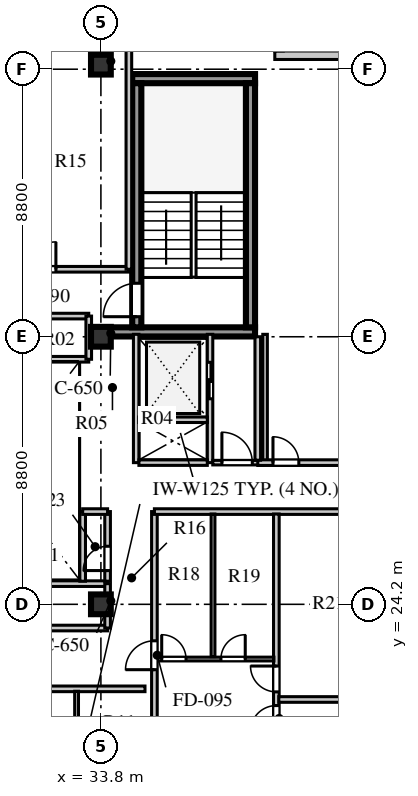
"""IFC4 building model, lengths in metres.
Left out: names, types, materials, properties, quantities, classifications, styles, units other than length and angle.
Written with IfcOpenShell. Run it as: python <this file> out.ifc"""

import sys

from ifc_helpers import new_model, si_unit, direction, frame, frame_2d, origin, origin_2d, place, context, subcontext, project, spatial, rectangle, extrude, element, fill, save


model = new_model("IFC4")
c1 = context("Model", 3, precision=1e-05, world=origin(), true_north=direction((0.0, 1.0)))
c2 = subcontext(c1, "Body", "Model", "MODEL_VIEW")
j1 = project(units=[si_unit("LENGTHUNIT", "METRE"), si_unit("PLANEANGLEUNIT", "RADIAN")], contexts=[c1])
p1 = place(None, origin())
s1 = spatial("IfcSite", under=j1, at=p1, CompositionType="ELEMENT")
p2 = place(p1, origin())
s2 = spatial("IfcBuilding", under=s1, at=p2, CompositionType="ELEMENT")
p3 = place(p2, frame((0.0, 0.0, 335.3)))
s3 = spatial("IfcBuildingStorey", under=s2, at=p3, CompositionType="ELEMENT", Elevation=335.3)
p4 = place(p3, frame((34.125, 33.16, 0.0), z_axis=(0.0, 0.0, 1.0), x_axis=(1.0, 0.0, 0.0)))
e1 = element("IfcWall", 1, at=p4, inside=s3, PredefinedType="SHEAR", context=c2, shape_type="SweptSolid", body=[
    extrude(rectangle(XDim=4.745, YDim=0.3, at=frame_2d((2.373, 0.0))), origin(), (0.0, 0.0, 1.0), 3.56),
])
p5 = place(p3, frame((34.83, 41.49, 0.0), z_axis=(0.0, 0.0, 1.0), x_axis=(1.0, 0.0, 0.0)))
e2 = element("IfcWall", 2, at=p5, inside=s3, PredefinedType="SHEAR", context=c2, shape_type="SweptSolid", body=[
    extrude(rectangle(XDim=4.04, YDim=0.3, at=frame_2d((2.02, 0.0))), origin(), (0.0, 0.0, 1.0), 3.56),
])
p6 = place(p3, frame((34.98, 33.31, 0.0), z_axis=(0.0, 0.0, 1.0), x_axis=(0.0, 1.0, 0.0)))
e3 = element("IfcWall", 3, at=p6, inside=s3, PredefinedType="SHEAR", context=c2, shape_type="SweptSolid", body=[
    extrude(rectangle(XDim=8.03, YDim=0.3, at=frame_2d((4.015, 0.0))), origin(), (0.0, 0.0, 1.0), 3.56),
])
p7 = place(p6, frame((0.35, 0.0, 0.0)))
e4 = element("IfcOpeningElement", 4, at=p7, cuts=e3, PredefinedType="OPENING", context=c2, shape_type="SweptSolid", body=[
    extrude(rectangle(XDim=1.1, YDim=2.1, at=frame_2d((0.55, 1.05))), frame((0.0, 0.16, 0.0), z_axis=(0.0, -1.0, 0.0), x_axis=(1.0, 0.0, 0.0)), (0.0, 0.0, 1.0), 0.32),
])
p8 = place(p3, frame((38.72, 33.31, 0.0), z_axis=(0.0, 0.0, 1.0), x_axis=(0.0, 1.0, 0.0)))
e5 = element("IfcWall", 5, at=p8, inside=s3, PredefinedType="SHEAR", context=c2, shape_type="SweptSolid", body=[
    extrude(rectangle(XDim=8.03, YDim=0.3, at=frame_2d((4.015, 0.0))), origin(), (0.0, 0.0, 1.0), 3.56),
])
for number, where, z_axis, x_axis in (
    (6, (33.8, 24.2, 0.0), (0.0, 0.0, 1.0), (1.0, 0.0, 0.0)),
    (7, (33.8, 33.0, 0.0), (0.0, 0.0, 1.0), (1.0, 0.0, 0.0)),
    (8, (33.8, 41.95, 0.0), (0.0, 0.0, 1.0), (1.0, 0.0, 0.0)),
):
    element("IfcColumn", number, at=place(p3, frame(where, z_axis=z_axis, x_axis=x_axis)), inside=s3, PredefinedType="COLUMN", context=c2, shape_type="SweptSolid", body=[
        extrude(rectangle(XDim=0.65, YDim=0.65, at=origin_2d()), origin(), (0.0, 0.0, 1.0), 3.56),
    ])
p9 = place(p3, frame((43.2, 42.26, 0.0), z_axis=(0.0, 0.0, 1.0), x_axis=(-1.0, 0.0, 0.0)))
e9 = element("IfcWall", 9, at=p9, inside=s3, PredefinedType="STANDARD", context=c2, shape_type="SweptSolid", body=[
    extrude(rectangle(XDim=3.68, YDim=0.28, at=frame_2d((1.84, 0.0))), origin(), (0.0, 0.0, 1.0), 2.92),
])
p10 = place(p3, frame((34.96, 28.86, 0.0), z_axis=(0.0, 0.0, 1.0), x_axis=(0.0, 1.0, 0.0)))
e10 = element("IfcWall", 10, at=p10, inside=s3, PredefinedType="SOLIDWALL", context=c2, shape_type="SweptSolid", body=[
    extrude(rectangle(XDim=4.22, YDim=0.18, at=frame_2d((2.11, 0.0))), origin(), (0.0, 0.0, 1.0), 3.56),
])
p11 = place(p3, frame((37.39, 28.86, 0.0), z_axis=(0.0, 0.0, 1.0), x_axis=(0.0, 1.0, 0.0)))
e11 = element("IfcWall", 11, at=p11, inside=s3, PredefinedType="SOLIDWALL", context=c2, shape_type="SweptSolid", body=[
    extrude(rectangle(XDim=4.22, YDim=0.18, at=frame_2d((2.11, 0.0))), origin(), (0.0, 0.0, 1.0), 3.56),
])
p12 = place(p11, frame((2.1, 0.0, 0.0)))
e12 = element("IfcOpeningElement", 12, at=p12, cuts=e11, PredefinedType="OPENING", context=c2, shape_type="SweptSolid", body=[
    extrude(rectangle(XDim=1.2, YDim=2.12, at=frame_2d((0.6, 1.06))), frame((0.0, 0.1, 0.0), z_axis=(0.0, -1.0, 0.0), x_axis=(1.0, 0.0, 0.0)), (0.0, 0.0, 1.0), 0.2),
])
for number, where, z_axis, x_axis in (
    (13, (35.05, 28.86, 0.0), (0.0, 0.0, 1.0), (1.0, 0.0, 0.0)),
    (14, (35.05, 30.27, 0.0), (0.0, 0.0, 1.0), (1.0, 0.0, 0.0)),
):
    element("IfcWall", number, at=place(p3, frame(where, z_axis=z_axis, x_axis=x_axis)), inside=s3, PredefinedType="SOLIDWALL", context=c2, shape_type="SweptSolid", body=[
        extrude(rectangle(XDim=2.25, YDim=0.18, at=frame_2d((1.125, 0.0))), origin(), (0.0, 0.0, 1.0), 3.56),
    ])
p13 = place(p3, frame((39.2, 28.86, 0.0), z_axis=(0.0, 0.0, 1.0), x_axis=(0.0, 1.0, 0.0)))
e15 = element("IfcWall", 15, at=p13, inside=s3, PredefinedType="PARTITIONING", context=c2, shape_type="SweptSolid", body=[
    extrude(rectangle(XDim=4.22, YDim=0.15, at=frame_2d((2.11, 0.0))), origin(), (0.0, 0.0, 1.0), 3.56),
])
p14 = place(p3, frame((37.48, 28.86, 0.0), z_axis=(0.0, 0.0, 1.0), x_axis=(1.0, 0.0, 0.0)))
e16 = element("IfcWall", 16, at=p14, inside=s3, PredefinedType="PARTITIONING", context=c2, shape_type="SweptSolid", body=[
    extrude(rectangle(XDim=1.64, YDim=0.15, at=frame_2d((0.82, 0.0))), origin(), (0.0, 0.0, 1.0), 3.56),
])
p15 = place(p14, frame((0.3, 0.0, 0.0)))
e17 = element("IfcOpeningElement", 17, at=p15, cuts=e16, PredefinedType="OPENING", context=c2, shape_type="SweptSolid", body=[
    extrude(rectangle(XDim=1.0, YDim=2.1, at=frame_2d((0.5, 1.05))), frame((0.0, 0.085, 0.0), z_axis=(0.0, -1.0, 0.0), x_axis=(1.0, 0.0, 0.0)), (0.0, 0.0, 1.0), 0.17),
])
p16 = place(p3, frame((27.08, 21.42, 0.0), z_axis=(0.0, 0.0, 1.0), x_axis=(1.0, 0.0, 0.0)))
e18 = element("IfcWall", 18, at=p16, inside=s3, PredefinedType="SOLIDWALL", context=c2, shape_type="SweptSolid", body=[
    extrude(rectangle(XDim=8.17, YDim=0.185, at=frame_2d((4.085, 0.0))), origin(), (0.0, 0.0, 1.0), 3.26),
])
p17 = place(p16, frame((0.63, 0.0, 0.0)))
e19 = element("IfcOpeningElement", 19, at=p17, cuts=e18, PredefinedType="OPENING", context=c2, shape_type="SweptSolid", body=[
    extrude(rectangle(XDim=0.95, YDim=2.1, at=frame_2d((0.475, 1.05))), frame((0.0, 0.103, 0.0), z_axis=(0.0, -1.0, 0.0), x_axis=(1.0, 0.0, 0.0)), (0.0, 0.0, 1.0), 0.205),
])
p18 = place(p3, frame((25.22, 35.22, 0.0), z_axis=(0.0, 0.0, 1.0), x_axis=(1.0, 0.0, 0.0)))
e20 = element("IfcWall", 20, at=p18, inside=s3, PredefinedType="SOLIDWALL", context=c2, shape_type="SweptSolid", body=[
    extrude(rectangle(XDim=9.5, YDim=0.185, at=frame_2d((4.75, 0.0))), origin(), (0.0, 0.0, 1.0), 3.56),
])
p19 = place(p18, frame((3.2, 0.0, 0.0)))
e21 = element("IfcOpeningElement", 21, at=p19, cuts=e20, PredefinedType="OPENING", context=c2, shape_type="SweptSolid", body=[
    extrude(rectangle(XDim=1.0, YDim=2.08, at=frame_2d((0.5, 1.04))), frame((0.0, 0.103, 0.0), z_axis=(0.0, -1.0, 0.0), x_axis=(1.0, 0.0, 0.0)), (0.0, 0.0, 1.0), 0.205),
])
p20 = place(p18, frame((6.2, 0.0, 0.0)))
e22 = element("IfcOpeningElement", 22, at=p20, cuts=e20, PredefinedType="OPENING", context=c2, shape_type="SweptSolid", body=[
    extrude(rectangle(XDim=0.9, YDim=2.08, at=frame_2d((0.45, 1.04))), frame((0.0, 0.103, 0.0), z_axis=(0.0, -1.0, 0.0), x_axis=(1.0, 0.0, 0.0)), (0.0, 0.0, 1.0), 0.205),
])
p21 = place(p3, frame((33.0, 16.397, 0.0), z_axis=(0.0, 0.0, 1.0), x_axis=(0.0, 1.0, 0.0)))
e23 = element("IfcWall", 23, at=p21, inside=s3, PredefinedType="PLUMBINGWALL", context=c2, shape_type="SweptSolid", body=[
    extrude(rectangle(XDim=4.943, YDim=0.125, at=frame_2d((2.472, 0.0))), origin(), (0.0, 0.0, 1.0), 3.56),
])
p22 = place(p21, frame((0.16, 0.0, 0.0)))
e24 = element("IfcOpeningElement", 24, at=p22, cuts=e23, PredefinedType="OPENING", context=c2, shape_type="SweptSolid", body=[
    extrude(rectangle(XDim=0.8, YDim=2.05, at=frame_2d((0.4, 1.025))), frame((0.0, 0.073, 0.0), z_axis=(0.0, -1.0, 0.0), x_axis=(1.0, 0.0, 0.0)), (0.0, 0.0, 1.0), 0.145),
])
p23 = place(p21, frame((2.653, 0.0, 0.0)))
e25 = element("IfcOpeningElement", 25, at=p23, cuts=e23, PredefinedType="OPENING", context=c2, shape_type="SweptSolid", body=[
    extrude(rectangle(XDim=0.85, YDim=2.08, at=frame_2d((0.425, 1.04))), frame((0.0, 0.073, 0.0), z_axis=(0.0, -1.0, 0.0), x_axis=(1.0, 0.0, 0.0)), (0.0, 0.0, 1.0), 0.145),
])
p24 = place(p3, frame((34.72, 35.22, 0.0), z_axis=(0.0, 0.0, 1.0), x_axis=(0.0, 1.0, 0.0)))
e26 = element("IfcWall", 26, at=p24, inside=s3, PredefinedType="SOLIDWALL", context=c2, shape_type="SweptSolid", body=[
    extrude(rectangle(XDim=10.3, YDim=0.185, at=frame_2d((5.15, 0.0))), origin(), (0.0, 0.0, 1.0), 3.56),
])
p25 = place(p3, frame((35.56, 15.08, 0.0), z_axis=(0.0, 0.0, 1.0), x_axis=(0.0, 1.0, 0.0)))
e27 = element("IfcWall", 27, at=p25, inside=s3, PredefinedType="SOLIDWALL", context=c2, shape_type="SweptSolid", body=[
    extrude(rectangle(XDim=12.17, YDim=0.185, at=frame_2d((6.085, 0.0))), origin(), (0.0, 0.0, 1.0), 3.56),
])
p26 = place(p25, frame((6.97, 0.0, 0.0)))
e28 = element("IfcOpeningElement", 28, at=p26, cuts=e27, PredefinedType="OPENING", context=c2, shape_type="SweptSolid", body=[
    extrude(rectangle(XDim=0.95, YDim=2.1, at=frame_2d((0.475, 1.05))), frame((0.0, 0.103, 0.0), z_axis=(0.0, -1.0, 0.0), x_axis=(1.0, 0.0, 0.0)), (0.0, 0.0, 1.0), 0.205),
])
p27 = place(p3, frame((35.56, 27.25, 0.0), z_axis=(0.0, 0.0, 1.0), x_axis=(1.0, 0.0, 0.0)))
e29 = element("IfcWall", 29, at=p27, inside=s3, PredefinedType="SOLIDWALL", context=c2, shape_type="SweptSolid", body=[
    extrude(rectangle(XDim=7.36, YDim=0.185, at=frame_2d((3.68, 0.0))), origin(), (0.0, 0.0, 1.0), 3.56),
])
p28 = place(p3, frame((39.571, 15.16, 0.0), z_axis=(0.0, 0.0, 1.0), x_axis=(0.0, 1.0, 0.0)))
e30 = element("IfcWall", 30, at=p28, inside=s3, PredefinedType="SOLIDWALL", context=c2, shape_type="SweptSolid", body=[
    extrude(rectangle(XDim=12.01, YDim=0.185, at=frame_2d((6.005, 0.0))), origin(), (0.0, 0.0, 1.0), 3.56),
])
p29 = place(p28, frame((4.86, 0.0, 0.0)))
e31 = element("IfcOpeningElement", 31, at=p29, cuts=e30, PredefinedType="OPENING", context=c2, shape_type="SweptSolid", body=[
    extrude(rectangle(XDim=0.85, YDim=2.08, at=frame_2d((0.425, 1.04))), frame((0.0, 0.103, 0.0), z_axis=(0.0, -1.0, 0.0), x_axis=(1.0, 0.0, 0.0)), (0.0, 0.0, 1.0), 0.205),
])
p30 = place(p28, frame((6.16, 0.0, 0.0)))
e32 = element("IfcOpeningElement", 32, at=p30, cuts=e30, PredefinedType="OPENING", context=c2, shape_type="SweptSolid", body=[
    extrude(rectangle(XDim=0.85, YDim=2.08, at=frame_2d((0.425, 1.04))), frame((0.0, 0.103, 0.0), z_axis=(0.0, -1.0, 0.0), x_axis=(1.0, 0.0, 0.0)), (0.0, 0.0, 1.0), 0.205),
])
p31 = place(p3, frame((35.64, 22.4, 0.0), z_axis=(0.0, 0.0, 1.0), x_axis=(1.0, 0.0, 0.0)))
e33 = element("IfcWall", 33, at=p31, inside=s3, PredefinedType="PLUMBINGWALL", context=c2, shape_type="SweptSolid", body=[
    extrude(rectangle(XDim=3.851, YDim=0.125, at=frame_2d((1.926, 0.0))), origin(), (0.0, 0.0, 1.0), 3.56),
])
p32 = place(p31, frame((0.16, 0.0, 0.0)))
e34 = element("IfcOpeningElement", 34, at=p32, cuts=e33, PredefinedType="OPENING", context=c2, shape_type="SweptSolid", body=[
    extrude(rectangle(XDim=0.8, YDim=2.05, at=frame_2d((0.4, 1.025))), frame((0.0, 0.073, 0.0), z_axis=(0.0, -1.0, 0.0), x_axis=(1.0, 0.0, 0.0)), (0.0, 0.0, 1.0), 0.145),
])
p33 = place(p31, frame((2.108, 0.0, 0.0)))
e35 = element("IfcOpeningElement", 35, at=p33, cuts=e33, PredefinedType="OPENING", context=c2, shape_type="SweptSolid", body=[
    extrude(rectangle(XDim=0.8, YDim=2.05, at=frame_2d((0.4, 1.025))), frame((0.0, 0.073, 0.0), z_axis=(0.0, -1.0, 0.0), x_axis=(1.0, 0.0, 0.0)), (0.0, 0.0, 1.0), 0.145),
])
p34 = place(p3, frame((37.488, 22.48, 0.0), z_axis=(0.0, 0.0, 1.0), x_axis=(0.0, 1.0, 0.0)))
e36 = element("IfcWall", 36, at=p34, inside=s3, PredefinedType="PLUMBINGWALL", context=c2, shape_type="SweptSolid", body=[
    extrude(rectangle(XDim=4.69, YDim=0.125, at=frame_2d((2.345, 0.0))), origin(), (0.0, 0.0, 1.0), 3.56),
])
p35 = place(p3, frame((39.651, 21.07, 0.0), z_axis=(0.0, 0.0, 1.0), x_axis=(1.0, 0.0, 0.0)))
e37 = element("IfcWall", 37, at=p35, inside=s3, PredefinedType="SOLIDWALL", context=c2, shape_type="SweptSolid", body=[
    extrude(rectangle(XDim=3.269, YDim=0.185, at=frame_2d((1.635, 0.0))), origin(), (0.0, 0.0, 1.0), 3.56),
])
p36 = place(p3, frame((38.96, 28.86, 0.0), z_axis=(0.0, 0.0, 1.0), x_axis=(1.0, 0.0, 0.0)))
e38 = element("IfcWall", 38, at=p36, inside=s3, PredefinedType="SOLIDWALL", context=c2, shape_type="SweptSolid", body=[
    extrude(rectangle(XDim=3.96, YDim=0.185, at=frame_2d((1.98, 0.0))), origin(), (0.0, 0.0, 1.0), 3.56),
])
p37 = place(p36, frame((0.5, 0.0, 0.0)))
e39 = element("IfcOpeningElement", 39, at=p37, cuts=e38, PredefinedType="OPENING", context=c2, shape_type="SweptSolid", body=[
    extrude(rectangle(XDim=0.85, YDim=2.05, at=frame_2d((0.425, 1.025))), frame((0.0, 0.103, 0.0), z_axis=(0.0, -1.0, 0.0), x_axis=(1.0, 0.0, 0.0)), (0.0, 0.0, 1.0), 0.205),
])
p38 = place(p3, frame((38.96, 28.94, 0.0), z_axis=(0.0, 0.0, 1.0), x_axis=(0.0, 1.0, 0.0)))
e40 = element("IfcWall", 40, at=p38, inside=s3, PredefinedType="SOLIDWALL", context=c2, shape_type="SweptSolid", body=[
    extrude(rectangle(XDim=4.06, YDim=0.185, at=frame_2d((2.03, 0.0))), origin(), (0.0, 0.0, 1.0), 3.56),
])
p39 = place(p3, frame((27.2, 23.42, 0.0), z_axis=(0.0, 0.0, 1.0), x_axis=(1.0, 0.0, 0.0)))
e41 = element("IfcWall", 41, at=p39, inside=s3, PredefinedType="SOLIDWALL", context=c2, shape_type="SweptSolid", body=[
    extrude(rectangle(XDim=6.82, YDim=0.185, at=frame_2d((3.41, 0.0))), origin(), (0.0, 0.0, 1.0), 3.56),
])
p40 = place(p39, frame((0.43, 0.0, 0.0)))
e42 = element("IfcOpeningElement", 42, at=p40, cuts=e41, PredefinedType="OPENING", context=c2, shape_type="SweptSolid", body=[
    extrude(rectangle(XDim=0.8, YDim=2.05, at=frame_2d((0.4, 1.025))), frame((0.0, 0.103, 0.0), z_axis=(0.0, -1.0, 0.0), x_axis=(1.0, 0.0, 0.0)), (0.0, 0.0, 1.0), 0.205),
])
p41 = place(p3, frame((27.2, 24.88, 0.0), z_axis=(0.0, 0.0, 1.0), x_axis=(1.0, 0.0, 0.0)))
e43 = element("IfcWall", 43, at=p41, inside=s3, PredefinedType="SOLIDWALL", context=c2, shape_type="SweptSolid", body=[
    extrude(rectangle(XDim=6.82, YDim=0.185, at=frame_2d((3.41, 0.0))), origin(), (0.0, 0.0, 1.0), 3.01),
])
p42 = place(p3, frame((34.02, 23.42, 0.0), z_axis=(0.0, 0.0, 1.0), x_axis=(0.0, 1.0, 0.0)))
e44 = element("IfcWall", 44, at=p42, inside=s3, PredefinedType="SOLIDWALL", context=c2, shape_type="SweptSolid", body=[
    extrude(rectangle(XDim=1.46, YDim=0.185, at=frame_2d((0.73, 0.0))), origin(), (0.0, 0.0, 1.0), 2.96),
])
p43 = place(p3, frame((33.2, 24.96, 0.0), z_axis=(0.0, 0.0, 1.0), x_axis=(0.0, 1.0, 0.0)))
e45 = element("IfcWall", 45, at=p43, inside=s3, PredefinedType="SOLIDWALL", context=c2, shape_type="SweptSolid", body=[
    extrude(rectangle(XDim=2.29, YDim=0.185, at=frame_2d((1.145, 0.0))), origin(), (0.0, 0.0, 1.0), 3.01),
])
p44 = place(p3, frame((34.02, 24.96, 0.0), z_axis=(0.0, 0.0, 1.0), x_axis=(0.0, 1.0, 0.0)))
e46 = element("IfcWall", 46, at=p44, inside=s3, PredefinedType="SOLIDWALL", context=c2, shape_type="SweptSolid", body=[
    extrude(rectangle(XDim=2.29, YDim=0.185, at=frame_2d((1.145, 0.0))), origin(), (0.0, 0.0, 1.0), 2.96),
])
p45 = place(p44, frame((0.35, 0.0, 0.0)))
e47 = element("IfcOpeningElement", 47, at=p45, cuts=e46, PredefinedType="OPENING", context=c2, shape_type="SweptSolid", body=[
    extrude(rectangle(XDim=0.8, YDim=2.05, at=frame_2d((0.4, 1.025))), frame((0.0, 0.103, 0.0), z_axis=(0.0, -1.0, 0.0), x_axis=(1.0, 0.0, 0.0)), (0.0, 0.0, 1.0), 0.205),
])
p46 = place(p3, frame((33.2, 27.25, 0.0), z_axis=(0.0, 0.0, 1.0), x_axis=(1.0, 0.0, 0.0)))
e48 = element("IfcWall", 48, at=p46, inside=s3, PredefinedType="SOLIDWALL", context=c2, shape_type="SweptSolid", body=[
    extrude(rectangle(XDim=0.82, YDim=0.185, at=frame_2d((0.41, 0.0))), origin(), (0.0, 0.0, 1.0), 3.56),
])
p47 = place(p3, frame((27.2, 33.68, 0.0), z_axis=(0.0, 0.0, 1.0), x_axis=(1.0, 0.0, 0.0)))
e49 = element("IfcWall", 49, at=p47, inside=s3, PredefinedType="SOLIDWALL", context=c2, shape_type="SweptSolid", body=[
    extrude(rectangle(XDim=6.2, YDim=0.185, at=frame_2d((3.1, 0.0))), origin(), (0.0, 0.0, 1.0), 3.56),
])
p48 = place(p47, frame((1.2, 0.0, 0.0)))
e50 = element("IfcOpeningElement", 50, at=p48, cuts=e49, PredefinedType="OPENING", context=c2, shape_type="SweptSolid", body=[
    extrude(rectangle(XDim=0.8, YDim=2.05, at=frame_2d((0.4, 1.025))), frame((0.0, 0.103, 0.0), z_axis=(0.0, -1.0, 0.0), x_axis=(1.0, 0.0, 0.0)), (0.0, 0.0, 1.0), 0.205),
])
p49 = place(p3, frame((27.2, 32.26, 0.0), z_axis=(0.0, 0.0, 1.0), x_axis=(1.0, 0.0, 0.0)))
e51 = element("IfcWall", 51, at=p49, inside=s3, PredefinedType="SOLIDWALL", context=c2, shape_type="SweptSolid", body=[
    extrude(rectangle(XDim=6.2, YDim=0.185, at=frame_2d((3.1, 0.0))), origin(), (0.0, 0.0, 1.0), 3.01),
])
p50 = place(p3, frame((33.4, 32.26, 0.0), z_axis=(0.0, 0.0, 1.0), x_axis=(0.0, 1.0, 0.0)))
e52 = element("IfcWall", 52, at=p50, inside=s3, PredefinedType="SOLIDWALL", context=c2, shape_type="SweptSolid", body=[
    extrude(rectangle(XDim=1.42, YDim=0.185, at=frame_2d((0.71, 0.0))), origin(), (0.0, 0.0, 1.0), 3.01),
])
p51 = place(p7, origin())
e53 = element("IfcDoor", 53, at=p51, inside=s3, OperationType="SINGLE_SWING_LEFT", PredefinedType="DOOR", context=c2, shape_type="SweptSolid", body=[
    extrude(rectangle(XDim=1.1, YDim=2.1, at=frame_2d((0.55, 1.05))), frame((0.0, 0.025, 0.0), z_axis=(0.0, -1.0, 0.0), x_axis=(1.0, 0.0, 0.0)), (0.0, 0.0, 1.0), 0.05),
])
fill(e4, e53)
p52 = place(p12, frame((1.2, 0.0, 0.0), z_axis=(0.0, 0.0, 1.0), x_axis=(-1.0, 0.0, 0.0)))
e54 = element("IfcDoor", 54, at=p52, inside=s3, OperationType="DOUBLE_DOOR_SLIDING", PredefinedType="DOOR", context=c2, shape_type="SweptSolid", body=[
    extrude(rectangle(XDim=1.2, YDim=2.12, at=frame_2d((0.6, 1.06))), frame((0.0, 0.025, 0.0), z_axis=(0.0, -1.0, 0.0), x_axis=(1.0, 0.0, 0.0)), (0.0, 0.0, 1.0), 0.05),
])
fill(e12, e54)
p53 = place(p15, origin())
e55 = element("IfcDoor", 55, at=p53, inside=s3, OperationType="SINGLE_SWING_LEFT", PredefinedType="DOOR", context=c2, shape_type="SweptSolid", body=[
    extrude(rectangle(XDim=1.0, YDim=2.1, at=frame_2d((0.5, 1.05))), frame((0.0, 0.025, 0.0), z_axis=(0.0, -1.0, 0.0), x_axis=(1.0, 0.0, 0.0)), (0.0, 0.0, 1.0), 0.05),
])
fill(e17, e55)
p54 = place(p20, origin())
e56 = element("IfcDoor", 56, at=p54, inside=s3, OperationType="SINGLE_SWING_RIGHT", PredefinedType="DOOR", context=c2, shape_type="SweptSolid", body=[
    extrude(rectangle(XDim=0.9, YDim=2.08, at=frame_2d((0.45, 1.04))), frame((0.0, 0.025, 0.0), z_axis=(0.0, -1.0, 0.0), x_axis=(1.0, 0.0, 0.0)), (0.0, 0.0, 1.0), 0.05),
])
fill(e22, e56)
p55 = place(p32, origin())
e57 = element("IfcDoor", 57, at=p55, inside=s3, OperationType="SINGLE_SWING_LEFT", PredefinedType="DOOR", context=c2, shape_type="SweptSolid", body=[
    extrude(rectangle(XDim=0.8, YDim=2.05, at=frame_2d((0.4, 1.025))), frame((0.0, 0.025, 0.0), z_axis=(0.0, -1.0, 0.0), x_axis=(1.0, 0.0, 0.0)), (0.0, 0.0, 1.0), 0.05),
])
fill(e34, e57)
p56 = place(p33, origin())
e58 = element("IfcDoor", 58, at=p56, inside=s3, OperationType="SINGLE_SWING_RIGHT", PredefinedType="DOOR", context=c2, shape_type="SweptSolid", body=[
    extrude(rectangle(XDim=0.8, YDim=2.05, at=frame_2d((0.4, 1.025))), frame((0.0, 0.025, 0.0), z_axis=(0.0, -1.0, 0.0), x_axis=(1.0, 0.0, 0.0)), (0.0, 0.0, 1.0), 0.05),
])
fill(e35, e58)
p57 = place(p29, origin())
e59 = element("IfcDoor", 59, at=p57, inside=s3, OperationType="SINGLE_SWING_LEFT", PredefinedType="DOOR", context=c2, shape_type="SweptSolid", body=[
    extrude(rectangle(XDim=0.85, YDim=2.08, at=frame_2d((0.425, 1.04))), frame((0.0, 0.025, 0.0), z_axis=(0.0, -1.0, 0.0), x_axis=(1.0, 0.0, 0.0)), (0.0, 0.0, 1.0), 0.05),
])
fill(e31, e59)
p58 = place(p30, origin())
e60 = element("IfcDoor", 60, at=p58, inside=s3, OperationType="SINGLE_SWING_RIGHT", PredefinedType="DOOR", context=c2, shape_type="SweptSolid", body=[
    extrude(rectangle(XDim=0.85, YDim=2.08, at=frame_2d((0.425, 1.04))), frame((0.0, 0.025, 0.0), z_axis=(0.0, -1.0, 0.0), x_axis=(1.0, 0.0, 0.0)), (0.0, 0.0, 1.0), 0.05),
])
fill(e32, e60)
p59 = place(p26, origin())
e61 = element("IfcDoor", 61, at=p59, inside=s3, OperationType="SINGLE_SWING_LEFT", PredefinedType="DOOR", context=c2, shape_type="SweptSolid", body=[
    extrude(rectangle(XDim=0.95, YDim=2.1, at=frame_2d((0.475, 1.05))), frame((0.0, 0.025, 0.0), z_axis=(0.0, -1.0, 0.0), x_axis=(1.0, 0.0, 0.0)), (0.0, 0.0, 1.0), 0.05),
])
fill(e28, e61)
p60 = place(p37, origin())
e62 = element("IfcDoor", 62, at=p60, inside=s3, OperationType="SINGLE_SWING_LEFT", PredefinedType="DOOR", context=c2, shape_type="SweptSolid", body=[
    extrude(rectangle(XDim=0.85, YDim=2.05, at=frame_2d((0.425, 1.025))), frame((0.0, 0.025, 0.0), z_axis=(0.0, -1.0, 0.0), x_axis=(1.0, 0.0, 0.0)), (0.0, 0.0, 1.0), 0.05),
])
fill(e39, e62)
p61 = place(p45, origin())
e63 = element("IfcDoor", 63, at=p61, inside=s3, OperationType="SINGLE_SWING_LEFT", PredefinedType="DOOR", context=c2, shape_type="SweptSolid", body=[
    extrude(rectangle(XDim=0.8, YDim=2.05, at=frame_2d((0.4, 1.025))), frame((0.0, 0.025, 0.0), z_axis=(0.0, -1.0, 0.0), x_axis=(1.0, 0.0, 0.0)), (0.0, 0.0, 1.0), 0.05),
])
fill(e47, e63)
save(model, sys.argv[1])
